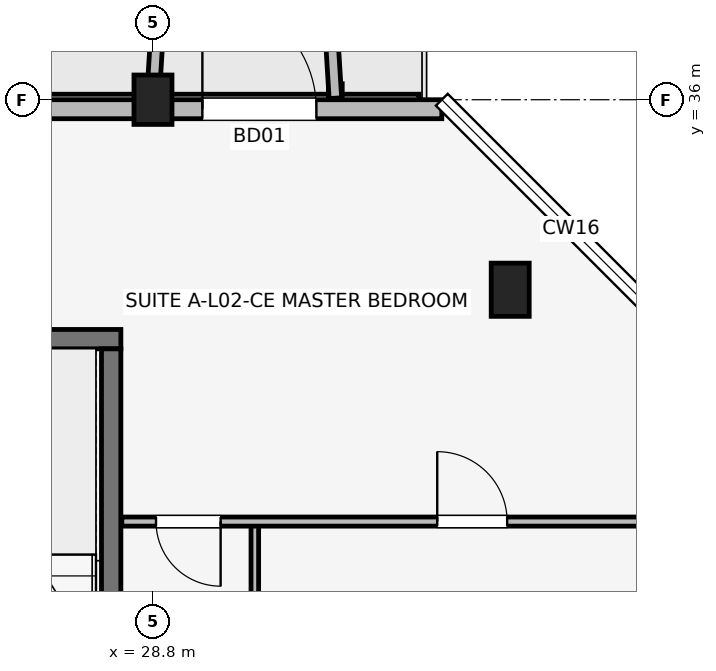
"""IFC4 building model, lengths in metres.
Left out: names, types, materials, properties, quantities, classifications, styles, units other than length and angle.
Written with IfcOpenShell. Run it as: python <this file> out.ifc"""

import sys

from ifc_helpers import new_model, si_unit, direction, frame, frame_2d, origin, origin_2d, place, context, subcontext, project, spatial, rectangle, extrude, element, fill, save


model = new_model("IFC4")
c1 = context("Model", 3, precision=1e-05, world=origin(), true_north=direction((0.0, 1.0)))
c2 = subcontext(c1, "Body", "Model", "MODEL_VIEW")
j1 = project(units=[si_unit("LENGTHUNIT", "METRE"), si_unit("PLANEANGLEUNIT", "RADIAN")], contexts=[c1])
p1 = place(None, origin())
s1 = spatial("IfcSite", under=j1, at=p1, CompositionType="ELEMENT")
p2 = place(p1, origin())
s2 = spatial("IfcBuilding", under=s1, at=p2, CompositionType="ELEMENT")
p3 = place(p2, frame((0.0, 0.0, 8.7)))
s3 = spatial("IfcBuildingStorey", under=s2, at=p3, CompositionType="ELEMENT", Elevation=8.7)
p4 = place(p3, frame((28.8, 36.0, 0.0), z_axis=(0.0, 0.0, 1.0), x_axis=(1.0, 0.0, 0.0)))
e1 = element("IfcColumn", 1, at=p4, inside=s3, PredefinedType="COLUMN", context=c2, shape_type="SweptSolid", body=[
    extrude(rectangle(XDim=0.5, YDim=0.65, at=origin_2d()), origin(), (0.0, 0.0, 1.0), 3.15),
])
p5 = place(p3, frame((33.5, 33.5, 0.0), z_axis=(0.0, 0.0, 1.0), x_axis=(1.0, 0.0, 0.0)))
e2 = element("IfcColumn", 2, at=p5, inside=s3, PredefinedType="COLUMN", context=c2, shape_type="SweptSolid", body=[
    extrude(rectangle(XDim=0.5, YDim=0.7, at=origin_2d()), origin(), (0.0, 0.0, 1.0), 3.15),
])
p6 = place(p3, frame((25.073, 32.85, 0.0), z_axis=(0.0, 0.0, 1.0), x_axis=(1.0, 0.0, 0.0)))
e3 = element("IfcWall", 3, at=p6, inside=s3, PredefinedType="SHEAR", context=c2, shape_type="SweptSolid", body=[
    extrude(rectangle(XDim=3.305, YDim=0.255, at=frame_2d((1.652, 0.0))), origin(), (0.0, 0.0, 1.0), 3.15),
])
p7 = place(p3, frame((28.25, 26.427, 0.0), z_axis=(0.0, 0.0, 1.0), x_axis=(0.0, 1.0, 0.0)))
e4 = element("IfcWall", 4, at=p7, inside=s3, PredefinedType="SHEAR", context=c2, shape_type="SweptSolid", body=[
    extrude(rectangle(XDim=6.295, YDim=0.255, at=frame_2d((3.147, 0.0))), origin(), (0.0, 0.0, 1.0), 3.15),
])
p8 = place(p3, frame((32.6, 35.875, 0.0), z_axis=(0.0, 0.0, 1.0), x_axis=(-1.0, 0.0, 0.0)))
e5 = element("IfcWall", 5, at=p8, inside=s3, PredefinedType="SOLIDWALL", context=c2, shape_type="SweptSolid", body=[
    extrude(rectangle(XDim=29.2, YDim=0.25, at=frame_2d((14.6, 0.0))), origin(), (0.0, 0.0, 1.0), 2.43),
])
p9 = place(p8, frame((27.55, 0.0, 0.0), z_axis=(0.0, 0.0, 1.0), x_axis=(-1.0, 0.0, 0.0)))
e6 = element("IfcOpeningElement", 6, at=p9, cuts=e5, PredefinedType="OPENING", context=c2, shape_type="SweptSolid", body=[
    extrude(rectangle(XDim=1.5, YDim=2.15, at=frame_2d((0.75, 1.075))), frame((0.0, 0.135, 0.0), z_axis=(0.0, -1.0, 0.0), x_axis=(1.0, 0.0, 0.0)), (0.0, 0.0, 1.0), 0.27),
])
p10 = place(p8, frame((3.15, 0.0, 0.0), z_axis=(0.0, 0.0, 1.0), x_axis=(-1.0, 0.0, 0.0)))
e7 = element("IfcOpeningElement", 7, at=p10, cuts=e5, PredefinedType="OPENING", context=c2, shape_type="SweptSolid", body=[
    extrude(rectangle(XDim=1.5, YDim=2.15, at=frame_2d((0.75, 1.075))), frame((0.0, 0.135, 0.0), z_axis=(0.0, -1.0, 0.0), x_axis=(1.0, 0.0, 0.0)), (0.0, 0.0, 1.0), 0.27),
])
p11 = place(p8, frame((14.025, 0.0, 0.5)))
e8 = element("IfcOpeningElement", 8, at=p11, cuts=e5, PredefinedType="OPENING", context=c2, shape_type="SweptSolid", body=[
    extrude(rectangle(XDim=1.15, YDim=1.68, at=frame_2d((0.575, 0.84))), frame((0.0, 0.135, 0.0), z_axis=(0.0, -1.0, 0.0), x_axis=(1.0, 0.0, 0.0)), (0.0, 0.0, 1.0), 0.27),
])
p12 = place(p8, frame((8.725, 0.0, 0.7)))
e9 = element("IfcOpeningElement", 9, at=p12, cuts=e5, PredefinedType="OPENING", context=c2, shape_type="SweptSolid", body=[
    extrude(rectangle(XDim=1.86, YDim=1.6, at=frame_2d((0.93, 0.8))), frame((0.0, 0.135, 0.0), z_axis=(0.0, -1.0, 0.0), x_axis=(1.0, 0.0, 0.0)), (0.0, 0.0, 1.0), 0.27),
])
p13 = place(p8, frame((18.615, 0.0, 0.7)))
e10 = element("IfcOpeningElement", 10, at=p13, cuts=e5, PredefinedType="OPENING", context=c2, shape_type="SweptSolid", body=[
    extrude(rectangle(XDim=1.86, YDim=1.6, at=frame_2d((0.93, 0.8))), frame((0.0, 0.135, 0.0), z_axis=(0.0, -1.0, 0.0), x_axis=(1.0, 0.0, 0.0)), (0.0, 0.0, 1.0), 0.27),
])
for number, where, z_axis, x_axis in (
    (11, (28.8, 36.02, 0.0), (0.0, 0.0, 1.0), (0.061, 0.998, 0.0)),
    (12, (31.2, 36.02, 0.0), (0.0, 0.0, 1.0), (-0.061, 0.998, 0.0)),
):
    element("IfcWall", number, at=place(p3, frame(where, z_axis=z_axis, x_axis=x_axis)), inside=s3, PredefinedType="ELEMENTEDWALL", context=c2, shape_type="SweptSolid", body=[
        extrude(rectangle(XDim=1.964, YDim=0.165, at=frame_2d((0.982, 0.0))), origin(), (0.0, 0.0, 1.0), 2.95),
    ])
p14 = place(p3, frame((30.14, 26.1, 0.0), z_axis=(0.0, 0.0, 1.0), x_axis=(0.0, 1.0, 0.0)))
e13 = element("IfcWall", 13, at=p14, inside=s3, PredefinedType="PARTITIONING", context=c2, shape_type="SweptSolid", body=[
    extrude(rectangle(XDim=4.35, YDim=0.1, at=frame_2d((2.175, 0.0))), origin(), (0.0, 0.0, 1.0), 2.375),
])
p15 = place(p3, frame((28.39, 30.45, 0.0), z_axis=(0.0, 0.0, 1.0), x_axis=(1.0, 0.0, 0.0)))
e14 = element("IfcWall", 14, at=p15, inside=s3, PredefinedType="PARTITIONING", context=c2, shape_type="SweptSolid", body=[
    extrude(rectangle(XDim=7.47, YDim=0.12, at=frame_2d((3.735, 0.0))), origin(), (0.0, 0.0, 1.0), 2.38),
])
p16 = place(p15, frame((1.3, 0.0, 0.0), z_axis=(0.0, 0.0, 1.0), x_axis=(-1.0, 0.0, 0.0)))
e15 = element("IfcOpeningElement", 15, at=p16, cuts=e14, PredefinedType="OPENING", context=c2, shape_type="SweptSolid", body=[
    extrude(rectangle(XDim=0.85, YDim=2.08, at=frame_2d((0.425, 1.04))), frame((0.0, 0.07, 0.0), z_axis=(0.0, -1.0, 0.0), x_axis=(1.0, 0.0, 0.0)), (0.0, 0.0, 1.0), 0.14),
])
p17 = place(p15, frame((4.15, 0.0, 0.0)))
e16 = element("IfcOpeningElement", 16, at=p17, cuts=e14, PredefinedType="OPENING", context=c2, shape_type="SweptSolid", body=[
    extrude(rectangle(XDim=0.92, YDim=2.08, at=frame_2d((0.46, 1.04))), frame((0.0, 0.07, 0.0), z_axis=(0.0, -1.0, 0.0), x_axis=(1.0, 0.0, 0.0)), (0.0, 0.0, 1.0), 0.14),
])
p18 = place(p10, origin())
e17 = element("IfcDoor", 17, at=p18, inside=s3, OperationType="SINGLE_SWING_RIGHT", PredefinedType="DOOR", context=c2, shape_type="SweptSolid", body=[
    extrude(rectangle(XDim=1.5, YDim=2.15, at=frame_2d((0.75, 1.075))), frame((0.0, 0.025, 0.0), z_axis=(0.0, -1.0, 0.0), x_axis=(1.0, 0.0, 0.0)), (0.0, 0.0, 1.0), 0.05),
])
fill(e7, e17)
p19 = place(p16, origin())
e18 = element("IfcDoor", 18, at=p19, inside=s3, OperationType="SINGLE_SWING_RIGHT", PredefinedType="DOOR", context=c2, shape_type="SweptSolid", body=[
    extrude(rectangle(XDim=0.85, YDim=2.08, at=frame_2d((0.425, 1.04))), frame((0.0, 0.025, 0.0), z_axis=(0.0, -1.0, 0.0), x_axis=(1.0, 0.0, 0.0)), (0.0, 0.0, 1.0), 0.05),
])
fill(e15, e18)
p20 = place(p17, origin())
e19 = element("IfcDoor", 19, at=p20, inside=s3, OperationType="SINGLE_SWING_LEFT", PredefinedType="DOOR", context=c2, shape_type="SweptSolid", body=[
    extrude(rectangle(XDim=0.92, YDim=2.08, at=frame_2d((0.46, 1.04))), frame((0.0, 0.025, 0.0), z_axis=(0.0, -1.0, 0.0), x_axis=(1.0, 0.0, 0.0)), (0.0, 0.0, 1.0), 0.05),
])
fill(e16, e19)
save(model, sys.argv[1])
